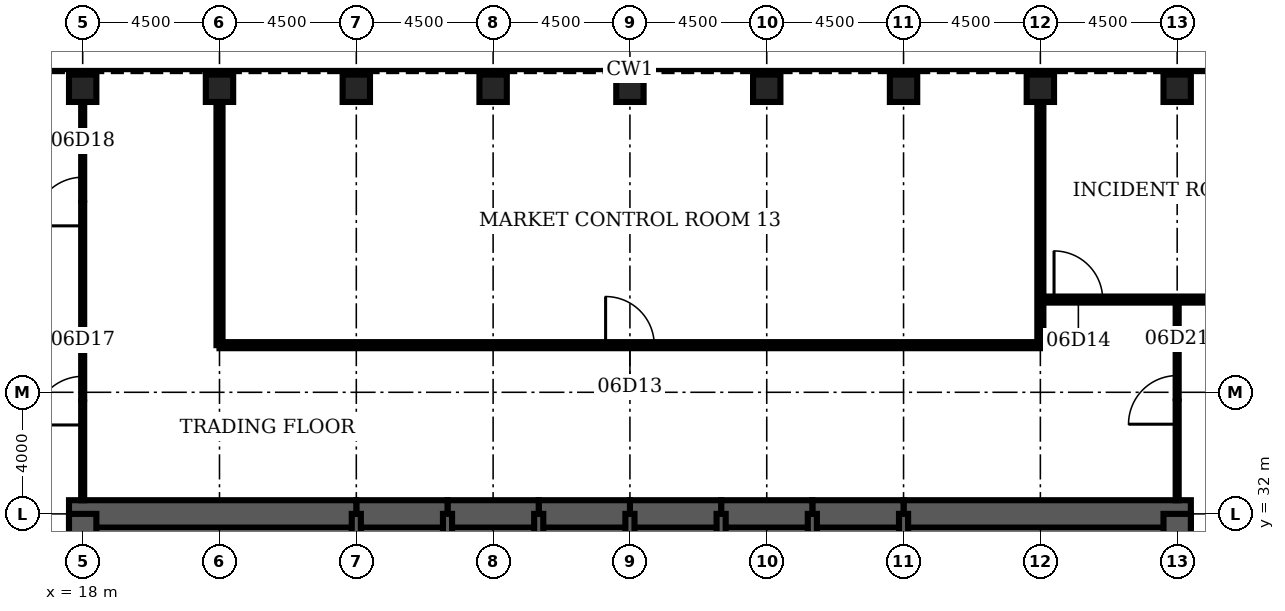
"""IFC4 building model, lengths in metres.
Left out: names, types, materials, properties, quantities, classifications, styles, units other than length and angle.
Written with IfcOpenShell. Run it as: python <this file> out.ifc"""

import sys

from ifc_helpers import new_model, si_unit, direction, frame, frame_2d, origin, origin_2d, place, context, subcontext, project, spatial, rectangle, hollow_rectangle, extrude, element, fill, save


model = new_model("IFC4")
c1 = context("Model", 3, precision=1e-05, world=origin(), true_north=direction((0.0, 1.0)))
c2 = subcontext(c1, "Body", "Model", "MODEL_VIEW")
j1 = project(units=[si_unit("LENGTHUNIT", "METRE"), si_unit("PLANEANGLEUNIT", "RADIAN")], contexts=[c1])
p1 = place(None, origin())
s1 = spatial("IfcSite", under=j1, at=p1, CompositionType="ELEMENT")
p2 = place(p1, origin())
s2 = spatial("IfcBuilding", under=s1, at=p2, CompositionType="ELEMENT")
p3 = place(p2, frame((0.0, 0.0, 32.0)))
s3 = spatial("IfcBuildingStorey", under=s2, at=p3, CompositionType="ELEMENT", Elevation=32.0)
for number, where, z_axis, x_axis in (
    (1, (54.0, 46.0, 0.0), (0.0, 0.0, 1.0), (0.0, 1.0, 0.0)),
    (2, (49.5, 46.0, 0.0), (0.0, 0.0, 1.0), (0.0, 1.0, 0.0)),
    (3, (45.0, 46.0, 0.0), (0.0, 0.0, 1.0), (0.0, 1.0, 0.0)),
    (4, (40.5, 46.0, 0.0), (0.0, 0.0, 1.0), (0.0, 1.0, 0.0)),
    (5, (36.0, 46.0, 0.0), (0.0, 0.0, 1.0), (0.0, 1.0, 0.0)),
    (6, (31.5, 46.0, 0.0), (0.0, 0.0, 1.0), (0.0, 1.0, 0.0)),
    (7, (27.0, 46.0, 0.0), (0.0, 0.0, 1.0), (0.0, 1.0, 0.0)),
    (8, (22.5, 46.0, 0.0), (0.0, 0.0, 1.0), (0.0, 1.0, 0.0)),
    (9, (18.0, 46.0, 0.0), (0.0, 0.0, 1.0), (0.0, 1.0, 0.0)),
):
    element("IfcColumn", number, at=place(p3, frame(where, z_axis=z_axis, x_axis=x_axis)), inside=s3, PredefinedType="COLUMN", context=c2, shape_type="SweptSolid", body=[
        extrude(hollow_rectangle(XDim=0.9, YDim=0.9, WallThickness=0.12, at=origin_2d()), origin(), (0.0, 0.0, 1.0), 4.5),
    ])
p4 = place(p3, frame((54.45, 32.0, 0.0), z_axis=(0.0, 0.0, 1.0), x_axis=(-1.0, 0.0, 0.0)))
e10 = element("IfcWall", 10, at=p4, inside=s3, PredefinedType="SHEAR", context=c2, shape_type="SweptSolid", body=[
    extrude(rectangle(XDim=9.45, YDim=0.9, at=frame_2d((4.725, 0.0))), origin(), (0.0, 0.0, 1.0), 4.5),
])
for number, where, z_axis, x_axis in (
    (11, (45.0, 32.0, 0.0), (0.0, 0.0, 1.0), (-1.0, 0.0, 0.0)),
    (12, (42.0, 32.0, 0.0), (0.0, 0.0, 1.0), (-1.0, 0.0, 0.0)),
    (13, (39.0, 32.0, 0.0), (0.0, 0.0, 1.0), (-1.0, 0.0, 0.0)),
    (14, (36.0, 32.0, 0.0), (0.0, 0.0, 1.0), (-1.0, 0.0, 0.0)),
    (15, (33.0, 32.0, 0.0), (0.0, 0.0, 1.0), (-1.0, 0.0, 0.0)),
    (16, (30.0, 32.0, 0.0), (0.0, 0.0, 1.0), (-1.0, 0.0, 0.0)),
):
    element("IfcWall", number, at=place(p3, frame(where, z_axis=z_axis, x_axis=x_axis)), inside=s3, PredefinedType="SHEAR", context=c2, shape_type="SweptSolid", body=[
        extrude(rectangle(XDim=3.0, YDim=0.9, at=frame_2d((1.5, 0.0))), origin(), (0.0, 0.0, 1.0), 4.5),
    ])
p5 = place(p3, frame((27.0, 32.0, 0.0), z_axis=(0.0, 0.0, 1.0), x_axis=(-1.0, 0.0, 0.0)))
e17 = element("IfcWall", 17, at=p5, inside=s3, PredefinedType="SHEAR", context=c2, shape_type="SweptSolid", body=[
    extrude(rectangle(XDim=9.45, YDim=0.9, at=frame_2d((4.725, 0.0))), origin(), (0.0, 0.0, 1.0), 4.5),
])
for number, where, z_axis, x_axis in (
    (18, (18.0, 32.0, 0.0), (0.0, 0.0, 1.0), (0.0, -1.0, 0.0)),
    (19, (54.0, 28.8, 0.0), (0.0, 0.0, 1.0), (0.0, 1.0, 0.0)),
):
    element("IfcWall", number, at=place(p3, frame(where, z_axis=z_axis, x_axis=x_axis)), inside=s3, PredefinedType="SHEAR", context=c2, shape_type="SweptSolid", body=[
        extrude(rectangle(XDim=3.2, YDim=0.9, at=frame_2d((1.6, 0.0))), origin(), (0.0, 0.0, 1.0), 4.5),
    ])
for number, where, z_axis, x_axis in (
    (20, (27.0, 28.8, 0.0), (0.0, 0.0, 1.0), (0.0, 1.0, 0.0)),
    (21, (30.0, 28.8, 0.0), (0.0, 0.0, 1.0), (0.0, 1.0, 0.0)),
    (22, (33.0, 28.8, 0.0), (0.0, 0.0, 1.0), (0.0, 1.0, 0.0)),
    (23, (36.0, 28.8, 0.0), (0.0, 0.0, 1.0), (0.0, 1.0, 0.0)),
    (24, (39.0, 28.8, 0.0), (0.0, 0.0, 1.0), (0.0, 1.0, 0.0)),
    (25, (42.0, 28.8, 0.0), (0.0, 0.0, 1.0), (0.0, 1.0, 0.0)),
    (26, (45.0, 28.8, 0.0), (0.0, 0.0, 1.0), (0.0, 1.0, 0.0)),
):
    element("IfcWall", number, at=place(p3, frame(where, z_axis=z_axis, x_axis=x_axis)), inside=s3, PredefinedType="SOLIDWALL", context=c2, shape_type="SweptSolid", body=[
        extrude(rectangle(XDim=3.2, YDim=0.3, at=frame_2d((1.6, 0.0))), origin(), (0.0, 0.0, 1.0), 4.5),
    ])
p6 = place(p3, frame((22.5, 37.55, 0.0), z_axis=(0.0, 0.0, 1.0), x_axis=(1.0, 0.0, 0.0)))
e27 = element("IfcWall", 27, at=p6, inside=s3, PredefinedType="PARTITIONING", context=c2, shape_type="SweptSolid", body=[
    extrude(rectangle(XDim=27.0, YDim=0.2, at=frame_2d((13.5, 0.0))), origin(), (0.0, 0.0, 1.0), 3.0),
])
p7 = place(p6, frame((12.7, 0.0, 0.0)))
e28 = element("IfcOpeningElement", 28, at=p7, cuts=e27, PredefinedType="OPENING", context=c2, shape_type="SweptSolid", body=[
    extrude(rectangle(XDim=1.6, YDim=2.1, at=frame_2d((0.8, 1.05))), frame((0.0, 0.11, 0.0), z_axis=(0.0, -1.0, 0.0), x_axis=(1.0, 0.0, 0.0)), (0.0, 0.0, 1.0), 0.22),
])
p8 = place(p3, frame((49.5, 39.05, 0.0), z_axis=(0.0, 0.0, 1.0), x_axis=(1.0, 0.0, 0.0)))
e29 = element("IfcWall", 29, at=p8, inside=s3, PredefinedType="PARTITIONING", context=c2, shape_type="SweptSolid", body=[
    extrude(rectangle(XDim=9.0, YDim=0.2, at=frame_2d((4.5, 0.0))), origin(), (0.0, 0.0, 1.0), 3.0),
])
p9 = place(p8, frame((0.45, 0.0, 0.0)))
e30 = element("IfcOpeningElement", 30, at=p9, cuts=e29, PredefinedType="OPENING", context=c2, shape_type="SweptSolid", body=[
    extrude(rectangle(XDim=1.6, YDim=2.1, at=frame_2d((0.8, 1.05))), frame((0.0, 0.11, 0.0), z_axis=(0.0, -1.0, 0.0), x_axis=(1.0, 0.0, 0.0)), (0.0, 0.0, 1.0), 0.22),
])
p10 = place(p3, frame((18.0, 32.45, 0.0), z_axis=(0.0, 0.0, 1.0), x_axis=(0.0, 1.0, 0.0)))
e31 = element("IfcWall", 31, at=p10, inside=s3, PredefinedType="PARTITIONING", context=c2, shape_type="SweptSolid", body=[
    extrude(rectangle(XDim=13.1, YDim=0.1, at=frame_2d((6.55, 0.0))), origin(), (0.0, 0.0, 1.0), 3.0),
])
p11 = place(p10, frame((2.475, 0.0, 0.0)))
e32 = element("IfcOpeningElement", 32, at=p11, cuts=e31, PredefinedType="OPENING", context=c2, shape_type="SweptSolid", body=[
    extrude(rectangle(XDim=1.6, YDim=2.1, at=frame_2d((0.8, 1.05))), frame((0.0, 0.06, 0.0), z_axis=(0.0, -1.0, 0.0), x_axis=(1.0, 0.0, 0.0)), (0.0, 0.0, 1.0), 0.12),
])
p12 = place(p10, frame((9.025, 0.0, 0.0)))
e33 = element("IfcOpeningElement", 33, at=p12, cuts=e31, PredefinedType="OPENING", context=c2, shape_type="SweptSolid", body=[
    extrude(rectangle(XDim=1.6, YDim=2.1, at=frame_2d((0.8, 1.05))), frame((0.0, 0.06, 0.0), z_axis=(0.0, -1.0, 0.0), x_axis=(1.0, 0.0, 0.0)), (0.0, 0.0, 1.0), 0.12),
])
for number, where, z_axis, x_axis in (
    (34, (22.5, 37.55, 0.0), (0.0, 0.0, 1.0), (0.0, 1.0, 0.0)),
    (35, (49.5, 37.55, 0.0), (0.0, 0.0, 1.0), (0.0, 1.0, 0.0)),
):
    element("IfcWall", number, at=place(p3, frame(where, z_axis=z_axis, x_axis=x_axis)), inside=s3, PredefinedType="PARTITIONING", context=c2, shape_type="SweptSolid", body=[
        extrude(rectangle(XDim=8.0, YDim=0.2, at=frame_2d((4.0, 0.0))), origin(), (0.0, 0.0, 1.0), 3.0),
    ])
p13 = place(p3, frame((54.0, 32.45, 0.0), z_axis=(0.0, 0.0, 1.0), x_axis=(0.0, 1.0, 0.0)))
e36 = element("IfcWall", 36, at=p13, inside=s3, PredefinedType="PARTITIONING", context=c2, shape_type="SweptSolid", body=[
    extrude(rectangle(XDim=6.6, YDim=0.1, at=frame_2d((3.3, 0.0))), origin(), (0.0, 0.0, 1.0), 3.0),
])
p14 = place(p13, frame((2.5, 0.0, 0.0)))
e37 = element("IfcOpeningElement", 37, at=p14, cuts=e36, PredefinedType="OPENING", context=c2, shape_type="SweptSolid", body=[
    extrude(rectangle(XDim=1.6, YDim=2.1, at=frame_2d((0.8, 1.05))), frame((0.0, 0.06, 0.0), z_axis=(0.0, -1.0, 0.0), x_axis=(1.0, 0.0, 0.0)), (0.0, 0.0, 1.0), 0.12),
])
p15 = place(p7, origin())
e38 = element("IfcDoor", 38, at=p15, inside=s3, OperationType="SINGLE_SWING_LEFT", PredefinedType="DOOR", context=c2, shape_type="SweptSolid", body=[
    extrude(rectangle(XDim=1.6, YDim=2.1, at=frame_2d((0.8, 1.05))), frame((0.0, 0.025, 0.0), z_axis=(0.0, -1.0, 0.0), x_axis=(1.0, 0.0, 0.0)), (0.0, 0.0, 1.0), 0.05),
])
fill(e28, e38)
p16 = place(p9, origin())
e39 = element("IfcDoor", 39, at=p16, inside=s3, OperationType="SINGLE_SWING_LEFT", PredefinedType="DOOR", context=c2, shape_type="SweptSolid", body=[
    extrude(rectangle(XDim=1.6, YDim=2.1, at=frame_2d((0.8, 1.05))), frame((0.0, 0.025, 0.0), z_axis=(0.0, -1.0, 0.0), x_axis=(1.0, 0.0, 0.0)), (0.0, 0.0, 1.0), 0.05),
])
fill(e30, e39)
p17 = place(p11, origin())
e40 = element("IfcDoor", 40, at=p17, inside=s3, OperationType="SINGLE_SWING_LEFT", PredefinedType="DOOR", context=c2, shape_type="SweptSolid", body=[
    extrude(rectangle(XDim=1.6, YDim=2.1, at=frame_2d((0.8, 1.05))), frame((0.0, 0.025, 0.0), z_axis=(0.0, -1.0, 0.0), x_axis=(1.0, 0.0, 0.0)), (0.0, 0.0, 1.0), 0.05),
])
fill(e32, e40)
p18 = place(p12, origin())
e41 = element("IfcDoor", 41, at=p18, inside=s3, OperationType="SINGLE_SWING_LEFT", PredefinedType="DOOR", context=c2, shape_type="SweptSolid", body=[
    extrude(rectangle(XDim=1.6, YDim=2.1, at=frame_2d((0.8, 1.05))), frame((0.0, 0.025, 0.0), z_axis=(0.0, -1.0, 0.0), x_axis=(1.0, 0.0, 0.0)), (0.0, 0.0, 1.0), 0.05),
])
fill(e33, e41)
p19 = place(p14, origin())
e42 = element("IfcDoor", 42, at=p19, inside=s3, OperationType="SINGLE_SWING_LEFT", PredefinedType="DOOR", context=c2, shape_type="SweptSolid", body=[
    extrude(rectangle(XDim=1.6, YDim=2.1, at=frame_2d((0.8, 1.05))), frame((0.0, 0.025, 0.0), z_axis=(0.0, -1.0, 0.0), x_axis=(1.0, 0.0, 0.0)), (0.0, 0.0, 1.0), 0.05),
])
fill(e37, e42)
save(model, sys.argv[1])
